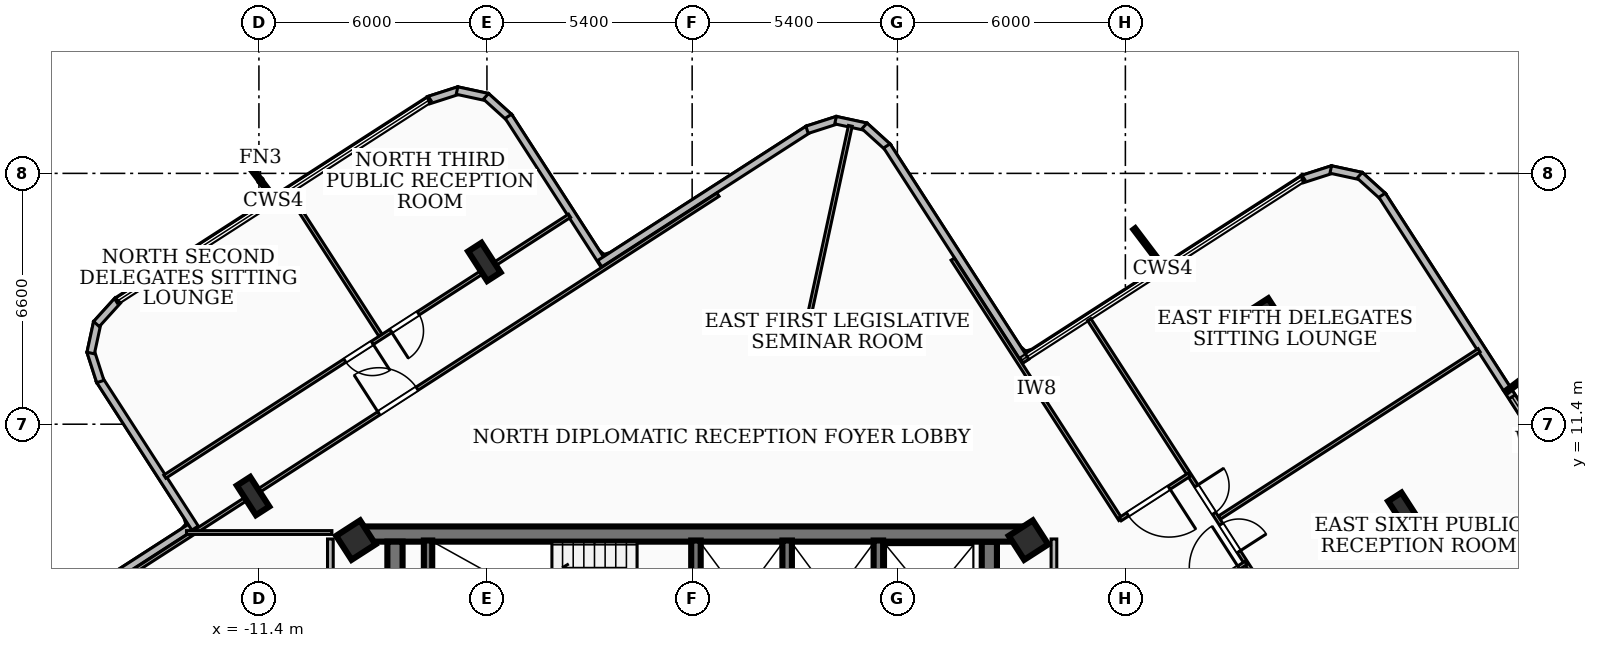
"""IFC4 building model, lengths in metres.
Left out: names, types, materials, properties, quantities, classifications, styles, units other than length and angle.
Written with IfcOpenShell. Run it as: python <this file> out.ifc"""

import sys

from ifc_helpers import new_model, si_unit, direction, frame, frame_2d, origin, origin_2d, place, context, subcontext, project, spatial, rectangle, i_section, extrude, element, fill, save


model = new_model("IFC4")
c1 = context("Model", 3, precision=1e-05, world=origin(), true_north=direction((0.0, 1.0)))
c2 = subcontext(c1, "Body", "Model", "MODEL_VIEW")
j1 = project(units=[si_unit("LENGTHUNIT", "METRE"), si_unit("PLANEANGLEUNIT", "RADIAN")], contexts=[c1])
p1 = place(None, origin())
s1 = spatial("IfcSite", under=j1, at=p1, CompositionType="ELEMENT")
p2 = place(p1, origin())
s2 = spatial("IfcBuilding", under=s1, at=p2, CompositionType="ELEMENT")
p3 = place(p2, frame((0.0, 0.0, 218.88)))
s3 = spatial("IfcBuildingStorey", under=s2, at=p3, CompositionType="ELEMENT", Elevation=218.88)
p4 = place(p3, frame((-8.78, 8.51, 0.0), z_axis=(0.0, 0.0, 1.0), x_axis=(1.0, 0.0, 0.0)))
e1 = element("IfcWall", 1, at=p4, inside=s3, PredefinedType="SHEAR", context=c2, shape_type="SweptSolid", body=[
    extrude(rectangle(XDim=17.56, YDim=0.4, at=frame_2d((8.78, 0.0))), origin(), (0.0, 0.0, 1.0), 3.14),
])
for number, where, z_axis, x_axis in (
    (2, (-7.82, 1.95, 0.0), (0.0, 0.0, 1.0), (0.0, 1.0, 0.0)),
    (3, (7.82, 8.31, 0.0), (0.0, 0.0, 1.0), (0.0, -1.0, 0.0)),
):
    element("IfcWall", number, at=place(p3, frame(where, z_axis=z_axis, x_axis=x_axis)), inside=s3, PredefinedType="SHEAR", context=c2, shape_type="SweptSolid", body=[
        extrude(rectangle(XDim=6.36, YDim=0.4, at=frame_2d((3.18, 0.0))), origin(), (0.0, 0.0, 1.0), 3.14),
    ])
p5 = place(p3, frame((-6.95, 5.28, 0.0), z_axis=(0.0, 0.0, 1.0), x_axis=(0.0, 1.0, 0.0)))
e4 = element("IfcWall", 4, at=p5, inside=s3, PredefinedType="SOLIDWALL", context=c2, shape_type="SweptSolid", body=[
    extrude(rectangle(XDim=3.06, YDim=0.22, at=frame_2d((1.53, 0.0))), origin(), (0.0, 0.0, 1.0), 3.14),
])
for number, where, z_axis, x_axis in (
    (5, (0.1, 5.3, 0.0), (0.0, 0.0, 1.0), (0.0, 1.0, 0.0)),
    (6, (2.5, 5.3, 0.0), (0.0, 0.0, 1.0), (0.0, 1.0, 0.0)),
    (7, (4.9, 5.3, 0.0), (0.0, 0.0, 1.0), (0.0, 1.0, 0.0)),
):
    element("IfcWall", number, at=place(p3, frame(where, z_axis=z_axis, x_axis=x_axis)), inside=s3, PredefinedType="SOLIDWALL", context=c2, shape_type="SweptSolid", body=[
        extrude(rectangle(XDim=3.04, YDim=0.25, at=frame_2d((1.52, 0.0))), origin(), (0.0, 0.0, 1.0), 3.14),
    ])
for number, where, z_axis, x_axis in (
    (8, (-8.85, 8.35, 0.0), (0.0, 0.0, 1.0), (0.841, 0.542, 0.0)),
    (9, (8.85, 8.35, 0.0), (0.0, 0.0, 1.0), (0.841, 0.542, 0.0)),
):
    element("IfcColumn", number, at=place(p3, frame(where, z_axis=z_axis, x_axis=x_axis)), inside=s3, PredefinedType="COLUMN", context=c2, shape_type="SweptSolid", body=[
        extrude(rectangle(XDim=0.75, YDim=0.75, at=origin_2d()), origin(), (0.0, 0.0, 1.0), 3.42),
    ])
for number, where, z_axis, x_axis in (
    (10, (18.741, 9.097, 0.0), (0.0, 0.0, 1.0), (0.841, 0.542, 0.0)),
    (11, (15.234, 14.209, 0.0), (0.0, 0.0, 1.0), (0.841, 0.542, 0.0)),
    (12, (-5.468, 15.671, 0.0), (0.0, 0.0, 1.0), (0.841, 0.542, 0.0)),
    (13, (-11.554, 9.51, 0.0), (0.0, 0.0, 1.0), (0.841, 0.542, 0.0)),
):
    element("IfcColumn", number, at=place(p3, frame(where, z_axis=z_axis, x_axis=x_axis)), inside=s3, PredefinedType="COLUMN", context=c2, shape_type="SweptSolid", body=[
        extrude(i_section(OverallWidth=0.418, OverallDepth=0.927, WebThickness=0.019, FlangeThickness=0.032, at=origin_2d()), origin(), (0.0, 0.0, 1.0), 3.42),
    ])
p6 = place(p3, frame((-18.723, 5.124, 0.0), z_axis=(0.0, 0.0, 1.0), x_axis=(0.840584959151, 0.541679726821, 0.0)))
e14 = element("IfcWall", 14, at=p6, inside=s3, PredefinedType="SOLIDWALL", context=c2, shape_type="SweptSolid", body=[
    extrude(rectangle(XDim=6.742, YDim=0.2, at=frame_2d((3.371, 0.0))), origin(), (0.0, 0.0, 1.0), 3.14),
])
p7 = place(p3, frame((-13.08, 8.666, 0.0), z_axis=(0.0, 0.0, 1.0), x_axis=(-0.541732711374, 0.840550813114, 0.0)))
e15 = element("IfcWall", 15, at=p7, inside=s3, PredefinedType="SOLIDWALL", context=c2, shape_type="SweptSolid", body=[
    extrude(rectangle(XDim=4.642, YDim=0.2, at=frame_2d((2.321, 0.0))), origin(), (0.0, 0.0, 1.0), 3.14),
])
p8 = place(p3, frame((-15.573, 12.523, 0.0), z_axis=(0.0, 0.0, 1.0), x_axis=(-0.306602907463, 0.951837516142, 0.0)))
e16 = element("IfcWall", 16, at=p8, inside=s3, PredefinedType="SOLIDWALL", context=c2, shape_type="SweptSolid", body=[
    extrude(rectangle(XDim=0.838, YDim=0.2, at=frame_2d((0.419, 0.0))), origin(), (0.0, 0.0, 1.0), 3.14),
])
p9 = place(p3, frame((-15.827, 13.273, 0.0), z_axis=(0.0, 0.0, 1.0), x_axis=(0.210782404691, 0.977533006027, 0.0)))
e17 = element("IfcWall", 17, at=p9, inside=s3, PredefinedType="SOLIDWALL", context=c2, shape_type="SweptSolid", body=[
    extrude(rectangle(XDim=0.825, YDim=0.2, at=frame_2d((0.412, 0.0))), origin(), (0.0, 0.0, 1.0), 3.14),
])
p10 = place(p3, frame((-15.675, 14.036, 0.0), z_axis=(0.0, 0.0, 1.0), x_axis=(0.671019988703, 0.741439258983, 0.0)))
e18 = element("IfcWall", 18, at=p10, inside=s3, PredefinedType="SOLIDWALL", context=c2, shape_type="SweptSolid", body=[
    extrude(rectangle(XDim=0.839, YDim=0.2, at=frame_2d((0.419, 0.0))), origin(), (0.0, 0.0, 1.0), 3.14),
])
p11 = place(p3, frame((-6.937, 19.925, 0.0), z_axis=(0.0, 0.0, 1.0), x_axis=(0.951922461344, 0.306339072907, 0.0)))
e19 = element("IfcWall", 19, at=p11, inside=s3, PredefinedType="SOLIDWALL", context=c2, shape_type="SweptSolid", body=[
    extrude(rectangle(XDim=0.838, YDim=0.2, at=frame_2d((0.419, 0.0))), origin(), (0.0, 0.0, 1.0), 3.14),
])
p12 = place(p3, frame((-6.187, 20.179, 0.0), z_axis=(0.0, 0.0, 1.0), x_axis=(0.977405889656, -0.211371064399, 0.0)))
e20 = element("IfcWall", 20, at=p12, inside=s3, PredefinedType="SOLIDWALL", context=c2, shape_type="SweptSolid", body=[
    extrude(rectangle(XDim=0.823, YDim=0.2, at=frame_2d((0.412, 0.0))), origin(), (0.0, 0.0, 1.0), 3.14),
])
p13 = place(p3, frame((-5.425, 20.027, 0.0), z_axis=(0.0, 0.0, 1.0), x_axis=(0.741439258983, -0.671019988703, 0.0)))
e21 = element("IfcWall", 21, at=p13, inside=s3, PredefinedType="SOLIDWALL", context=c2, shape_type="SweptSolid", body=[
    extrude(rectangle(XDim=0.839, YDim=0.2, at=frame_2d((0.419, 0.0))), origin(), (0.0, 0.0, 1.0), 3.14),
])
p14 = place(p3, frame((-4.836, 19.502, 0.0), z_axis=(0.0, 0.0, 1.0), x_axis=(0.541756659411, -0.840535378187, 0.0)))
e22 = element("IfcWall", 22, at=p14, inside=s3, PredefinedType="SOLIDWALL", context=c2, shape_type="SweptSolid", body=[
    extrude(rectangle(XDim=4.642, YDim=0.2, at=frame_2d((2.321, 0.0))), origin(), (0.0, 0.0, 1.0), 3.14),
])
p15 = place(p3, frame((-2.431, 15.624, 0.0), z_axis=(0.0, 0.0, 1.0), x_axis=(0.840561972283, 0.541715396451, 0.0)))
e23 = element("IfcWall", 23, at=p15, inside=s3, PredefinedType="SOLIDWALL", context=c2, shape_type="SweptSolid", body=[
    extrude(rectangle(XDim=6.542, YDim=0.2, at=frame_2d((3.271, 0.0))), origin(), (0.0, 0.0, 1.0), 3.14),
])
p16 = place(p3, frame((3.023, 19.146, 0.0), z_axis=(0.0, 0.0, 1.0), x_axis=(0.951837516142, 0.306602907463, 0.0)))
e24 = element("IfcWall", 24, at=p16, inside=s3, PredefinedType="SOLIDWALL", context=c2, shape_type="SweptSolid", body=[
    extrude(rectangle(XDim=0.838, YDim=0.2, at=frame_2d((0.419, 0.0))), origin(), (0.0, 0.0, 1.0), 3.14),
])
p17 = place(p3, frame((3.773, 19.4, 0.0), z_axis=(0.0, 0.0, 1.0), x_axis=(0.977467098281, -0.211087829535, 0.0)))
e25 = element("IfcWall", 25, at=p17, inside=s3, PredefinedType="SOLIDWALL", context=c2, shape_type="SweptSolid", body=[
    extrude(rectangle(XDim=0.823, YDim=0.2, at=frame_2d((0.412, 0.0))), origin(), (0.0, 0.0, 1.0), 3.14),
])
p18 = place(p3, frame((4.535, 19.248, 0.0), z_axis=(0.0, 0.0, 1.0), x_axis=(0.741439258983, -0.671019988703, 0.0)))
e26 = element("IfcWall", 26, at=p18, inside=s3, PredefinedType="SOLIDWALL", context=c2, shape_type="SweptSolid", body=[
    extrude(rectangle(XDim=0.839, YDim=0.2, at=frame_2d((0.419, 0.0))), origin(), (0.0, 0.0, 1.0), 3.14),
])
p19 = place(p3, frame((5.124, 18.723, 0.0), z_axis=(0.0, 0.0, 1.0), x_axis=(0.541679726821, -0.840584959151, 0.0)))
e27 = element("IfcWall", 27, at=p19, inside=s3, PredefinedType="SOLIDWALL", context=c2, shape_type="SweptSolid", body=[
    extrude(rectangle(XDim=6.742, YDim=0.2, at=frame_2d((3.371, 0.0))), origin(), (0.0, 0.0, 1.0), 3.14),
])
p20 = place(p3, frame((16.053, 17.848, 0.0), z_axis=(0.0, 0.0, 1.0), x_axis=(0.951946820804, 0.306263367646, 0.0)))
e28 = element("IfcWall", 28, at=p20, inside=s3, PredefinedType="SOLIDWALL", context=c2, shape_type="SweptSolid", body=[
    extrude(rectangle(XDim=0.839, YDim=0.2, at=frame_2d((0.42, 0.0))), origin(), (0.0, 0.0, 1.0), 3.14),
])
p21 = place(p3, frame((16.804, 18.102, 0.0), z_axis=(0.0, 0.0, 1.0), x_axis=(0.977405889656, -0.211371064399, 0.0)))
e29 = element("IfcWall", 29, at=p21, inside=s3, PredefinedType="SOLIDWALL", context=c2, shape_type="SweptSolid", body=[
    extrude(rectangle(XDim=0.823, YDim=0.2, at=frame_2d((0.412, 0.0))), origin(), (0.0, 0.0, 1.0), 3.14),
])
p22 = place(p3, frame((17.566, 17.95, 0.0), z_axis=(0.0, 0.0, 1.0), x_axis=(0.741439258983, -0.671019988703, 0.0)))
e30 = element("IfcWall", 30, at=p22, inside=s3, PredefinedType="SOLIDWALL", context=c2, shape_type="SweptSolid", body=[
    extrude(rectangle(XDim=0.839, YDim=0.2, at=frame_2d((0.419, 0.0))), origin(), (0.0, 0.0, 1.0), 3.14),
])
p23 = place(p3, frame((18.155, 17.425, 0.0), z_axis=(0.0, 0.0, 1.0), x_axis=(0.541713039183, -0.840563491462, 0.0)))
e31 = element("IfcWall", 31, at=p23, inside=s3, PredefinedType="SOLIDWALL", context=c2, shape_type="SweptSolid", body=[
    extrude(rectangle(XDim=9.824, YDim=0.2, at=frame_2d((4.912, 0.0))), origin(), (0.0, 0.0, 1.0), 3.14),
])
p24 = place(p23, frame((6.313, 0.0, 0.85)))
e32 = element("IfcOpeningElement", 32, at=p24, cuts=e31, PredefinedType="OPENING", context=c2, shape_type="SweptSolid", body=[
    extrude(rectangle(XDim=2.7, YDim=1.65, at=frame_2d((1.35, 0.825))), frame((0.0, 0.11, 0.0), z_axis=(0.0, -1.0, 0.0), x_axis=(1.0, 0.0, 0.0)), (0.0, 0.0, 1.0), 0.22),
])
p25 = place(p3, frame((-9.52, 1.75, 0.0), z_axis=(0.0, 0.0, 1.0), x_axis=(0.0, 1.0, 0.0)))
e33 = element("IfcWall", 33, at=p25, inside=s3, PredefinedType="PARTITIONING", context=c2, shape_type="SweptSolid", body=[
    extrude(rectangle(XDim=6.63, YDim=0.15, at=frame_2d((3.315, 0.0))), origin(), (0.0, 0.0, 1.0), 3.14),
])
p26 = place(p3, frame((9.52, 1.75, 0.0), z_axis=(0.0, 0.0, 1.0), x_axis=(0.0, 1.0, 0.0)))
e34 = element("IfcWall", 34, at=p26, inside=s3, PredefinedType="PARTITIONING", context=c2, shape_type="SweptSolid", body=[
    extrude(rectangle(XDim=6.63, YDim=0.15, at=frame_2d((3.315, 0.0))), origin(), (0.0, 0.0, 1.0), 2.51),
])
p27 = place(p3, frame((-13.306, 8.55, 0.0), z_axis=(0.0, 0.0, 1.0), x_axis=(1.0, 0.0, 0.0)))
e35 = element("IfcWall", 35, at=p27, inside=s3, PredefinedType="PARTITIONING", context=c2, shape_type="SweptSolid", body=[
    extrude(rectangle(XDim=3.826, YDim=0.1, at=frame_2d((1.913, 0.0))), origin(), (0.0, 0.0, 1.0), 2.51),
])
p28 = place(p3, frame((2.927, 13.54, 0.0), z_axis=(0.0, 0.0, 1.0), x_axis=(0.21141803497, 0.977395730751, 0.0)))
e36 = element("IfcWall", 36, at=p28, inside=s3, PredefinedType="PARTITIONING", context=c2, shape_type="SweptSolid", body=[
    extrude(rectangle(XDim=5.842, YDim=0.1, at=frame_2d((2.921, 0.0))), origin(), (0.0, 0.0, 1.0), 3.14),
])
p29 = place(p3, frame((11.27, 8.893, 0.0), z_axis=(0.0, 0.0, 1.0), x_axis=(-0.541761070726, 0.840532534912, 0.0)))
e37 = element("IfcWall", 37, at=p29, inside=s3, PredefinedType="PARTITIONING", context=c2, shape_type="SweptSolid", body=[
    extrude(rectangle(XDim=8.149, YDim=0.1, at=frame_2d((4.075, 0.0))), origin(), (0.0, 0.0, 1.0), 2.51),
])
p30 = place(p3, frame((13.08, 10.071, 0.0), z_axis=(0.0, 0.0, 1.0), x_axis=(-0.840623628822, -0.541619714067, 0.0)))
e38 = element("IfcWall", 38, at=p30, inside=s3, PredefinedType="PARTITIONING", context=c2, shape_type="SweptSolid", body=[
    extrude(rectangle(XDim=2.16, YDim=0.1, at=frame_2d((1.08, 0.0))), origin(), (0.0, 0.0, 1.0), 3.14),
])
p31 = place(p30, frame((0.63, 0.0, 0.0)))
e39 = element("IfcOpeningElement", 39, at=p31, cuts=e38, PredefinedType="OPENING", context=c2, shape_type="SweptSolid", body=[
    extrude(rectangle(XDim=1.3, YDim=2.1, at=frame_2d((0.65, 1.05))), frame((0.0, 0.06, 0.0), z_axis=(0.0, -1.0, 0.0), x_axis=(1.0, 0.0, 0.0)), (0.0, 0.0, 1.0), 0.12),
])
p32 = place(p3, frame((12.759, 6.581, 0.0), z_axis=(0.0, 0.0, 1.0), x_axis=(0.840641931508, 0.541591306236, 0.0)))
e40 = element("IfcWall", 40, at=p32, inside=s3, PredefinedType="PARTITIONING", context=c2, shape_type="SweptSolid", body=[
    extrude(rectangle(XDim=2.16, YDim=0.1, at=frame_2d((1.08, 0.0))), origin(), (0.0, 0.0, 1.0), 3.14),
])
p33 = place(p32, frame((0.63, 0.0, 0.0)))
e41 = element("IfcOpeningElement", 41, at=p33, cuts=e40, PredefinedType="OPENING", context=c2, shape_type="SweptSolid", body=[
    extrude(rectangle(XDim=1.3, YDim=2.1, at=frame_2d((0.65, 1.05))), frame((0.0, 0.06, 0.0), z_axis=(0.0, -1.0, 0.0), x_axis=(1.0, 0.0, 0.0)), (0.0, 0.0, 1.0), 0.12),
])
p34 = place(p3, frame((13.878, 8.944, 0.0), z_axis=(0.0, 0.0, 1.0), x_axis=(0.840576508336, 0.541692840671, 0.0)))
e42 = element("IfcWall", 42, at=p34, inside=s3, PredefinedType="PARTITIONING", context=c2, shape_type="SweptSolid", body=[
    extrude(rectangle(XDim=8.124, YDim=0.1, at=frame_2d((4.062, 0.0))), origin(), (0.0, 0.0, 1.0), 2.669),
])
p35 = place(p3, frame((10.449, 14.152, 0.0), z_axis=(0.0, 0.0, 1.0), x_axis=(0.541734007753, -0.8405499776, 0.0)))
e43 = element("IfcWall", 43, at=p35, inside=s3, PredefinedType="PARTITIONING", context=c2, shape_type="SweptSolid", body=[
    extrude(rectangle(XDim=12.67, YDim=0.1, at=frame_2d((6.335, 0.0))), origin(), (0.0, 0.0, 1.0), 2.51),
])
p36 = place(p35, frame((6.405, 0.0, 0.0)))
e44 = element("IfcOpeningElement", 44, at=p36, cuts=e43, PredefinedType="OPENING", context=c2, shape_type="SweptSolid", body=[
    extrude(rectangle(XDim=0.86, YDim=2.04, at=frame_2d((0.43, 1.02))), frame((0.0, 0.06, 0.0), z_axis=(0.0, -1.0, 0.0), x_axis=(1.0, 0.0, 0.0)), (0.0, 0.0, 1.0), 0.12),
])
p37 = place(p35, frame((5.205, 0.0, 0.0)))
e45 = element("IfcOpeningElement", 45, at=p37, cuts=e43, PredefinedType="OPENING", context=c2, shape_type="SweptSolid", body=[
    extrude(rectangle(XDim=0.86, YDim=2.04, at=frame_2d((0.43, 1.02))), frame((0.0, 0.06, 0.0), z_axis=(0.0, -1.0, 0.0), x_axis=(1.0, 0.0, 0.0)), (0.0, 0.0, 1.0), 0.12),
])
p38 = place(p3, frame((-16.331, 6.476, 0.0), z_axis=(0.0, 0.0, 1.0), x_axis=(0.840579457381, 0.541688264437, 0.0)))
e46 = element("IfcWall", 46, at=p38, inside=s3, PredefinedType="PARTITIONING", context=c2, shape_type="SweptSolid", body=[
    extrude(rectangle(XDim=20.238, YDim=0.1, at=frame_2d((10.119, 0.0))), origin(), (0.0, 0.0, 1.0), 2.51),
])
p39 = place(p38, frame((9.619, 0.0, 0.0)))
e47 = element("IfcOpeningElement", 47, at=p39, cuts=e46, PredefinedType="OPENING", context=c2, shape_type="SweptSolid", body=[
    extrude(rectangle(XDim=1.2, YDim=2.1, at=frame_2d((0.6, 1.05))), frame((0.0, 0.06, 0.0), z_axis=(0.0, -1.0, 0.0), x_axis=(1.0, 0.0, 0.0)), (0.0, 0.0, 1.0), 0.12),
])
p40 = place(p3, frame((-8.205, 13.747, 0.0), z_axis=(0.0, 0.0, 1.0), x_axis=(-0.541753189494, 0.840537614669, 0.0)))
e48 = element("IfcWall", 48, at=p40, inside=s3, PredefinedType="PARTITIONING", context=c2, shape_type="SweptSolid", body=[
    extrude(rectangle(XDim=4.435, YDim=0.1, at=frame_2d((2.218, 0.0))), origin(), (0.0, 0.0, 1.0), 3.14),
])
p41 = place(p3, frame((-3.226, 16.884, 0.0), z_axis=(0.0, 0.0, 1.0), x_axis=(-0.840579419228, -0.541688323642, 0.0)))
e49 = element("IfcWall", 49, at=p41, inside=s3, PredefinedType="PARTITIONING", context=c2, shape_type="SweptSolid", body=[
    extrude(rectangle(XDim=12.67, YDim=0.1, at=frame_2d((6.335, 0.0))), origin(), (0.0, 0.0, 1.0), 2.51),
])
p42 = place(p41, frame((4.735, 0.0, 0.0)))
e50 = element("IfcOpeningElement", 50, at=p42, cuts=e49, PredefinedType="OPENING", context=c2, shape_type="SweptSolid", body=[
    extrude(rectangle(XDim=0.86, YDim=2.04, at=frame_2d((0.43, 1.02))), frame((0.0, 0.06, 0.0), z_axis=(0.0, -1.0, 0.0), x_axis=(1.0, 0.0, 0.0)), (0.0, 0.0, 1.0), 0.12),
])
p43 = place(p41, frame((6.175, 0.0, 0.0)))
e51 = element("IfcOpeningElement", 51, at=p43, cuts=e49, PredefinedType="OPENING", context=c2, shape_type="SweptSolid", body=[
    extrude(rectangle(XDim=0.86, YDim=2.04, at=frame_2d((0.43, 1.02))), frame((0.0, 0.06, 0.0), z_axis=(0.0, -1.0, 0.0), x_axis=(1.0, 0.0, 0.0)), (0.0, 0.0, 1.0), 0.12),
])
p44 = place(p24, origin())
e52 = element("IfcWindow", 52, at=p44, inside=s3, PartitioningType="SINGLE_PANEL", PredefinedType="WINDOW", context=c2, shape_type="SweptSolid", body=[
    extrude(rectangle(XDim=2.7, YDim=1.65, at=frame_2d((1.35, 0.825))), frame((0.0, 0.03, 0.0), z_axis=(0.0, -1.0, 0.0), x_axis=(1.0, 0.0, 0.0)), (0.0, 0.0, 1.0), 0.06),
])
fill(e32, e52)
p45 = place(p31, origin())
e53 = element("IfcDoor", 53, at=p45, inside=s3, OperationType="SINGLE_SWING_LEFT", PredefinedType="DOOR", context=c2, shape_type="SweptSolid", body=[
    extrude(rectangle(XDim=1.3, YDim=2.1, at=frame_2d((0.65, 1.05))), frame((0.0, 0.025, 0.0), z_axis=(0.0, -1.0, 0.0), x_axis=(1.0, 0.0, 0.0)), (0.0, 0.0, 1.0), 0.05),
])
fill(e39, e53)
p46 = place(p33, origin())
e54 = element("IfcDoor", 54, at=p46, inside=s3, OperationType="SINGLE_SWING_RIGHT", PredefinedType="DOOR", context=c2, shape_type="SweptSolid", body=[
    extrude(rectangle(XDim=1.3, YDim=2.1, at=frame_2d((0.65, 1.05))), frame((0.0, 0.025, 0.0), z_axis=(0.0, -1.0, 0.0), x_axis=(1.0, 0.0, 0.0)), (0.0, 0.0, 1.0), 0.05),
])
fill(e41, e54)
p47 = place(p36, origin())
e55 = element("IfcDoor", 55, at=p47, inside=s3, OperationType="SINGLE_SWING_RIGHT", PredefinedType="DOOR", context=c2, shape_type="SweptSolid", body=[
    extrude(rectangle(XDim=0.86, YDim=2.04, at=frame_2d((0.43, 1.02))), frame((0.0, 0.025, 0.0), z_axis=(0.0, -1.0, 0.0), x_axis=(1.0, 0.0, 0.0)), (0.0, 0.0, 1.0), 0.05),
])
fill(e44, e55)
p48 = place(p37, origin())
e56 = element("IfcDoor", 56, at=p48, inside=s3, OperationType="SINGLE_SWING_LEFT", PredefinedType="DOOR", context=c2, shape_type="SweptSolid", body=[
    extrude(rectangle(XDim=0.86, YDim=2.04, at=frame_2d((0.43, 1.02))), frame((0.0, 0.025, 0.0), z_axis=(0.0, -1.0, 0.0), x_axis=(1.0, 0.0, 0.0)), (0.0, 0.0, 1.0), 0.05),
])
fill(e45, e56)
p49 = place(p39, origin())
e57 = element("IfcDoor", 57, at=p49, inside=s3, OperationType="SINGLE_SWING_LEFT", PredefinedType="DOOR", context=c2, shape_type="SweptSolid", body=[
    extrude(rectangle(XDim=1.2, YDim=2.1, at=frame_2d((0.6, 1.05))), frame((0.0, 0.025, 0.0), z_axis=(0.0, -1.0, 0.0), x_axis=(1.0, 0.0, 0.0)), (0.0, 0.0, 1.0), 0.05),
])
fill(e47, e57)
p50 = place(p42, origin())
e58 = element("IfcDoor", 58, at=p50, inside=s3, OperationType="SINGLE_SWING_RIGHT", PredefinedType="DOOR", context=c2, shape_type="SweptSolid", body=[
    extrude(rectangle(XDim=0.86, YDim=2.04, at=frame_2d((0.43, 1.02))), frame((0.0, 0.025, 0.0), z_axis=(0.0, -1.0, 0.0), x_axis=(1.0, 0.0, 0.0)), (0.0, 0.0, 1.0), 0.05),
])
fill(e50, e58)
p51 = place(p43, origin())
e59 = element("IfcDoor", 59, at=p51, inside=s3, OperationType="SINGLE_SWING_LEFT", PredefinedType="DOOR", context=c2, shape_type="SweptSolid", body=[
    extrude(rectangle(XDim=0.86, YDim=2.04, at=frame_2d((0.43, 1.02))), frame((0.0, 0.025, 0.0), z_axis=(0.0, -1.0, 0.0), x_axis=(1.0, 0.0, 0.0)), (0.0, 0.0, 1.0), 0.05),
])
fill(e51, e59)
save(model, sys.argv[1])
